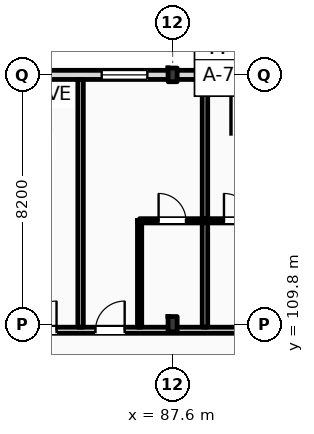
"""IFC4 building model, lengths in metres.
Left out: names, types, materials, properties, quantities, classifications, styles, units other than length and angle.
Written with IfcOpenShell. Run it as: python <this file> out.ifc"""

import sys

from ifc_helpers import new_model, si_unit, direction, frame, frame_2d, origin, origin_2d, place, context, subcontext, project, spatial, rectangle, i_section, extrude, element, fill, save


model = new_model("IFC4")
c1 = context("Model", 3, precision=1e-05, world=origin(), true_north=direction((0.0, 1.0)))
c2 = subcontext(c1, "Body", "Model", "MODEL_VIEW")
j1 = project(units=[si_unit("LENGTHUNIT", "METRE"), si_unit("PLANEANGLEUNIT", "RADIAN")], contexts=[c1])
p1 = place(None, origin())
s1 = spatial("IfcSite", under=j1, at=p1, CompositionType="ELEMENT")
p2 = place(p1, origin())
s2 = spatial("IfcBuilding", under=s1, at=p2, CompositionType="ELEMENT")
p3 = place(p2, frame((0.0, 0.0, 28.2)))
s3 = spatial("IfcBuildingStorey", under=s2, at=p3, CompositionType="ELEMENT", Elevation=28.2)
p4 = place(p3, frame((87.6, 109.8, 0.0), z_axis=(0.0, 0.0, 1.0), x_axis=(1.0, 0.0, 0.0)))
e1 = element("IfcColumn", 1, at=p4, inside=s3, PredefinedType="COLUMN", context=c2, shape_type="SweptSolid", body=[
    extrude(i_section(OverallWidth=0.3, OverallDepth=0.5, WebThickness=0.014, FlangeThickness=0.028, FilletRadius=0.027, at=origin_2d()), origin(), (0.0, 0.0, 1.0), 3.6),
])
p5 = place(p3, frame((87.6, 118.0, 0.0), z_axis=(0.0, 0.0, 1.0), x_axis=(1.0, 0.0, 0.0)))
e2 = element("IfcColumn", 2, at=p5, inside=s3, PredefinedType="COLUMN", context=c2, shape_type="SweptSolid", body=[
    extrude(i_section(OverallWidth=0.3, OverallDepth=0.45, WebThickness=0.014, FlangeThickness=0.026, FilletRadius=0.027, at=origin_2d()), origin(), (0.0, 0.0, 1.0), 3.6),
])
p6 = place(p3, frame((22.5, 118.0, 0.0), z_axis=(0.0, 0.0, 1.0), x_axis=(1.0, 0.0, 0.0)))
e3 = element("IfcWall", 3, at=p6, inside=s3, PredefinedType="STANDARD", context=c2, shape_type="SweptSolid", body=[
    extrude(rectangle(XDim=97.5, YDim=0.3, at=frame_2d((48.75, 0.0))), origin(), (0.0, 0.0, 1.0), 2.8),
])
p7 = place(p6, frame((0.91, 0.0, 0.9)))
e4 = element("IfcOpeningElement", 4, at=p7, cuts=e3, PredefinedType="OPENING", context=c2, shape_type="SweptSolid", body=[
    extrude(rectangle(XDim=0.9, YDim=1.72, at=frame_2d((0.45, 0.86))), frame((0.0, 0.16, 0.0), z_axis=(0.0, -1.0, 0.0), x_axis=(1.0, 0.0, 0.0)), (0.0, 0.0, 1.0), 0.32),
])
p8 = place(p6, frame((6.561, 0.0, 0.0)))
e5 = element("IfcOpeningElement", 5, at=p8, cuts=e3, PredefinedType="OPENING", context=c2, shape_type="SweptSolid", body=[
    extrude(rectangle(XDim=1.2, YDim=2.25, at=frame_2d((0.6, 1.125))), frame((0.0, 0.16, 0.0), z_axis=(0.0, -1.0, 0.0), x_axis=(1.0, 0.0, 0.0)), (0.0, 0.0, 1.0), 0.32),
])
p9 = place(p6, frame((11.477, 0.0, 0.9)))
e6 = element("IfcOpeningElement", 6, at=p9, cuts=e3, PredefinedType="OPENING", context=c2, shape_type="SweptSolid", body=[
    extrude(rectangle(XDim=1.1, YDim=1.5, at=frame_2d((0.55, 0.75))), frame((0.0, 0.16, 0.0), z_axis=(0.0, -1.0, 0.0), x_axis=(1.0, 0.0, 0.0)), (0.0, 0.0, 1.0), 0.32),
])
p10 = place(p6, frame((15.194, 0.0, 0.9)))
e7 = element("IfcOpeningElement", 7, at=p10, cuts=e3, PredefinedType="OPENING", context=c2, shape_type="SweptSolid", body=[
    extrude(rectangle(XDim=1.25, YDim=1.6, at=frame_2d((0.625, 0.8))), frame((0.0, 0.16, 0.0), z_axis=(0.0, -1.0, 0.0), x_axis=(1.0, 0.0, 0.0)), (0.0, 0.0, 1.0), 0.32),
])
p11 = place(p6, frame((19.509, 0.0, 0.9)))
e8 = element("IfcOpeningElement", 8, at=p11, cuts=e3, PredefinedType="OPENING", context=c2, shape_type="SweptSolid", body=[
    extrude(rectangle(XDim=1.4, YDim=1.7, at=frame_2d((0.7, 0.85))), frame((0.0, 0.16, 0.0), z_axis=(0.0, -1.0, 0.0), x_axis=(1.0, 0.0, 0.0)), (0.0, 0.0, 1.0), 0.32),
])
p12 = place(p6, frame((23.258, 0.0, 0.0)))
e9 = element("IfcOpeningElement", 9, at=p12, cuts=e3, PredefinedType="OPENING", context=c2, shape_type="SweptSolid", body=[
    extrude(rectangle(XDim=1.2, YDim=2.25, at=frame_2d((0.6, 1.125))), frame((0.0, 0.16, 0.0), z_axis=(0.0, -1.0, 0.0), x_axis=(1.0, 0.0, 0.0)), (0.0, 0.0, 1.0), 0.32),
])
p13 = place(p6, frame((28.115, 0.0, 0.9)))
e10 = element("IfcOpeningElement", 10, at=p13, cuts=e3, PredefinedType="OPENING", context=c2, shape_type="SweptSolid", body=[
    extrude(rectangle(XDim=1.75, YDim=1.72, at=frame_2d((0.875, 0.86))), frame((0.0, 0.16, 0.0), z_axis=(0.0, -1.0, 0.0), x_axis=(1.0, 0.0, 0.0)), (0.0, 0.0, 1.0), 0.32),
])
p14 = place(p6, frame((31.582, 0.0, 0.9)))
e11 = element("IfcOpeningElement", 11, at=p14, cuts=e3, PredefinedType="OPENING", context=c2, shape_type="SweptSolid", body=[
    extrude(rectangle(XDim=1.35, YDim=1.72, at=frame_2d((0.675, 0.86))), frame((0.0, 0.16, 0.0), z_axis=(0.0, -1.0, 0.0), x_axis=(1.0, 0.0, 0.0)), (0.0, 0.0, 1.0), 0.32),
])
p15 = place(p6, frame((37.379, 0.0, 0.0)))
e12 = element("IfcOpeningElement", 12, at=p15, cuts=e3, PredefinedType="OPENING", context=c2, shape_type="SweptSolid", body=[
    extrude(rectangle(XDim=1.2, YDim=2.25, at=frame_2d((0.6, 1.125))), frame((0.0, 0.16, 0.0), z_axis=(0.0, -1.0, 0.0), x_axis=(1.0, 0.0, 0.0)), (0.0, 0.0, 1.0), 0.32),
])
p16 = place(p6, frame((42.663, 0.0, 0.9)))
e13 = element("IfcOpeningElement", 13, at=p16, cuts=e3, PredefinedType="OPENING", context=c2, shape_type="SweptSolid", body=[
    extrude(rectangle(XDim=1.35, YDim=1.72, at=frame_2d((0.675, 0.86))), frame((0.0, 0.16, 0.0), z_axis=(0.0, -1.0, 0.0), x_axis=(1.0, 0.0, 0.0)), (0.0, 0.0, 1.0), 0.32),
])
p17 = place(p6, frame((45.119, 0.0, 0.9)))
e14 = element("IfcOpeningElement", 14, at=p17, cuts=e3, PredefinedType="OPENING", context=c2, shape_type="SweptSolid", body=[
    extrude(rectangle(XDim=2.871, YDim=1.72, at=frame_2d((1.436, 0.86))), frame((0.0, 0.16, 0.0), z_axis=(0.0, -1.0, 0.0), x_axis=(1.0, 0.0, 0.0)), (0.0, 0.0, 1.0), 0.32),
])
p18 = place(p6, frame((50.41, 0.0, 0.9)))
e15 = element("IfcOpeningElement", 15, at=p18, cuts=e3, PredefinedType="OPENING", context=c2, shape_type="SweptSolid", body=[
    extrude(rectangle(XDim=1.8, YDim=1.72, at=frame_2d((0.9, 0.86))), frame((0.0, 0.16, 0.0), z_axis=(0.0, -1.0, 0.0), x_axis=(1.0, 0.0, 0.0)), (0.0, 0.0, 1.0), 0.32),
])
p19 = place(p6, frame((54.375, 0.0, 0.0)))
e16 = element("IfcOpeningElement", 16, at=p19, cuts=e3, PredefinedType="OPENING", context=c2, shape_type="SweptSolid", body=[
    extrude(rectangle(XDim=1.2, YDim=2.25, at=frame_2d((0.6, 1.125))), frame((0.0, 0.16, 0.0), z_axis=(0.0, -1.0, 0.0), x_axis=(1.0, 0.0, 0.0)), (0.0, 0.0, 1.0), 0.32),
])
p20 = place(p6, frame((59.052, 0.0, 0.9)))
e17 = element("IfcOpeningElement", 17, at=p20, cuts=e3, PredefinedType="OPENING", context=c2, shape_type="SweptSolid", body=[
    extrude(rectangle(XDim=1.35, YDim=1.72, at=frame_2d((0.675, 0.86))), frame((0.0, 0.16, 0.0), z_axis=(0.0, -1.0, 0.0), x_axis=(1.0, 0.0, 0.0)), (0.0, 0.0, 1.0), 0.32),
])
p21 = place(p6, frame((62.768, 0.0, 0.9)))
e18 = element("IfcOpeningElement", 18, at=p21, cuts=e3, PredefinedType="OPENING", context=c2, shape_type="SweptSolid", body=[
    extrude(rectangle(XDim=1.5, YDim=1.72, at=frame_2d((0.75, 0.86))), frame((0.0, 0.16, 0.0), z_axis=(0.0, -1.0, 0.0), x_axis=(1.0, 0.0, 0.0)), (0.0, 0.0, 1.0), 0.32),
])
p22 = place(p6, frame((68.498, 0.0, 0.0)))
e19 = element("IfcOpeningElement", 19, at=p22, cuts=e3, PredefinedType="OPENING", context=c2, shape_type="SweptSolid", body=[
    extrude(rectangle(XDim=1.2, YDim=2.25, at=frame_2d((0.6, 1.125))), frame((0.0, 0.16, 0.0), z_axis=(0.0, -1.0, 0.0), x_axis=(1.0, 0.0, 0.0)), (0.0, 0.0, 1.0), 0.32),
])
p23 = place(p6, frame((71.265, 0.0, 0.9)))
e20 = element("IfcOpeningElement", 20, at=p23, cuts=e3, PredefinedType="OPENING", context=c2, shape_type="SweptSolid", body=[
    extrude(rectangle(XDim=0.9, YDim=1.72, at=frame_2d((0.45, 0.86))), frame((0.0, 0.16, 0.0), z_axis=(0.0, -1.0, 0.0), x_axis=(1.0, 0.0, 0.0)), (0.0, 0.0, 1.0), 0.32),
])
p24 = place(p6, frame((76.316, 0.0, 0.9)))
e21 = element("IfcOpeningElement", 21, at=p24, cuts=e3, PredefinedType="OPENING", context=c2, shape_type="SweptSolid", body=[
    extrude(rectangle(XDim=1.95, YDim=1.72, at=frame_2d((0.975, 0.86))), frame((0.0, 0.16, 0.0), z_axis=(0.0, -1.0, 0.0), x_axis=(1.0, 0.0, 0.0)), (0.0, 0.0, 1.0), 0.32),
])
p25 = place(p6, frame((81.632, 0.0, 0.9)))
e22 = element("IfcOpeningElement", 22, at=p25, cuts=e3, PredefinedType="OPENING", context=c2, shape_type="SweptSolid", body=[
    extrude(rectangle(XDim=1.35, YDim=1.72, at=frame_2d((0.675, 0.86))), frame((0.0, 0.16, 0.0), z_axis=(0.0, -1.0, 0.0), x_axis=(1.0, 0.0, 0.0)), (0.0, 0.0, 1.0), 0.32),
])
p26 = place(p6, frame((84.948, 0.0, 0.9)))
e23 = element("IfcOpeningElement", 23, at=p26, cuts=e3, PredefinedType="OPENING", context=c2, shape_type="SweptSolid", body=[
    extrude(rectangle(XDim=2.25, YDim=1.72, at=frame_2d((1.125, 0.86))), frame((0.0, 0.16, 0.0), z_axis=(0.0, -1.0, 0.0), x_axis=(1.0, 0.0, 0.0)), (0.0, 0.0, 1.0), 0.32),
])
p27 = place(p6, frame((90.063, 0.0, 0.9)))
e24 = element("IfcOpeningElement", 24, at=p27, cuts=e3, PredefinedType="OPENING", context=c2, shape_type="SweptSolid", body=[
    extrude(rectangle(XDim=1.8, YDim=1.72, at=frame_2d((0.9, 0.86))), frame((0.0, 0.16, 0.0), z_axis=(0.0, -1.0, 0.0), x_axis=(1.0, 0.0, 0.0)), (0.0, 0.0, 1.0), 0.32),
])
p28 = place(p6, frame((93.529, 0.0, 0.9)))
e25 = element("IfcOpeningElement", 25, at=p28, cuts=e3, PredefinedType="OPENING", context=c2, shape_type="SweptSolid", body=[
    extrude(rectangle(XDim=2.55, YDim=1.72, at=frame_2d((1.275, 0.86))), frame((0.0, 0.16, 0.0), z_axis=(0.0, -1.0, 0.0), x_axis=(1.0, 0.0, 0.0)), (0.0, 0.0, 1.0), 0.32),
])
p29 = place(p3, frame((10.65, 109.6, 0.0), z_axis=(0.0, 0.0, 1.0), x_axis=(1.0, 0.0, 0.0)))
e26 = element("IfcWall", 26, at=p29, inside=s3, PredefinedType="PARTITIONING", context=c2, shape_type="SweptSolid", body=[
    extrude(rectangle(XDim=109.21, YDim=0.2, at=frame_2d((54.605, 0.0))), origin(), (0.0, 0.0, 1.0), 2.8),
])
p30 = place(p29, frame((12.611, 0.0, 0.0)))
e27 = element("IfcOpeningElement", 27, at=p30, cuts=e26, PredefinedType="OPENING", context=c2, shape_type="SweptSolid", body=[
    extrude(rectangle(XDim=1.02, YDim=2.2, at=frame_2d((0.51, 1.1))), frame((0.0, 0.11, 0.0), z_axis=(0.0, -1.0, 0.0), x_axis=(1.0, 0.0, 0.0)), (0.0, 0.0, 1.0), 0.22),
])
p31 = place(p29, frame((19.451, 0.0, 0.0)))
e28 = element("IfcOpeningElement", 28, at=p31, cuts=e26, PredefinedType="OPENING", context=c2, shape_type="SweptSolid", body=[
    extrude(rectangle(XDim=1.02, YDim=2.2, at=frame_2d((0.51, 1.1))), frame((0.0, 0.11, 0.0), z_axis=(0.0, -1.0, 0.0), x_axis=(1.0, 0.0, 0.0)), (0.0, 0.0, 1.0), 0.22),
])
p32 = place(p29, frame((23.842, 0.0, 0.0)))
e29 = element("IfcOpeningElement", 29, at=p32, cuts=e26, PredefinedType="OPENING", context=c2, shape_type="SweptSolid", body=[
    extrude(rectangle(XDim=1.02, YDim=2.2, at=frame_2d((0.51, 1.1))), frame((0.0, 0.11, 0.0), z_axis=(0.0, -1.0, 0.0), x_axis=(1.0, 0.0, 0.0)), (0.0, 0.0, 1.0), 0.22),
])
p33 = place(p29, frame((26.084, 0.0, 0.0)))
e30 = element("IfcOpeningElement", 30, at=p33, cuts=e26, PredefinedType="OPENING", context=c2, shape_type="SweptSolid", body=[
    extrude(rectangle(XDim=1.02, YDim=2.2, at=frame_2d((0.51, 1.1))), frame((0.0, 0.11, 0.0), z_axis=(0.0, -1.0, 0.0), x_axis=(1.0, 0.0, 0.0)), (0.0, 0.0, 1.0), 0.22),
])
p34 = place(p29, frame((32.655, 0.0, 0.0)))
e31 = element("IfcOpeningElement", 31, at=p34, cuts=e26, PredefinedType="OPENING", context=c2, shape_type="SweptSolid", body=[
    extrude(rectangle(XDim=0.96, YDim=2.2, at=frame_2d((0.48, 1.1))), frame((0.0, 0.11, 0.0), z_axis=(0.0, -1.0, 0.0), x_axis=(1.0, 0.0, 0.0)), (0.0, 0.0, 1.0), 0.22),
])
p35 = place(p29, frame((34.895, 0.0, 0.0)))
e32 = element("IfcOpeningElement", 32, at=p35, cuts=e26, PredefinedType="OPENING", context=c2, shape_type="SweptSolid", body=[
    extrude(rectangle(XDim=0.96, YDim=2.2, at=frame_2d((0.48, 1.1))), frame((0.0, 0.11, 0.0), z_axis=(0.0, -1.0, 0.0), x_axis=(1.0, 0.0, 0.0)), (0.0, 0.0, 1.0), 0.22),
])
p36 = place(p29, frame((41.436, 0.0, 0.0)))
e33 = element("IfcOpeningElement", 33, at=p36, cuts=e26, PredefinedType="OPENING", context=c2, shape_type="SweptSolid", body=[
    extrude(rectangle(XDim=0.96, YDim=2.2, at=frame_2d((0.48, 1.1))), frame((0.0, 0.11, 0.0), z_axis=(0.0, -1.0, 0.0), x_axis=(1.0, 0.0, 0.0)), (0.0, 0.0, 1.0), 0.22),
])
p37 = place(p29, frame((43.427, 0.0, 0.0)))
e34 = element("IfcOpeningElement", 34, at=p37, cuts=e26, PredefinedType="OPENING", context=c2, shape_type="SweptSolid", body=[
    extrude(rectangle(XDim=0.96, YDim=2.2, at=frame_2d((0.48, 1.1))), frame((0.0, 0.11, 0.0), z_axis=(0.0, -1.0, 0.0), x_axis=(1.0, 0.0, 0.0)), (0.0, 0.0, 1.0), 0.22),
])
p38 = place(p29, frame((50.218, 0.0, 0.0)))
e35 = element("IfcOpeningElement", 35, at=p38, cuts=e26, PredefinedType="OPENING", context=c2, shape_type="SweptSolid", body=[
    extrude(rectangle(XDim=0.96, YDim=2.2, at=frame_2d((0.48, 1.1))), frame((0.0, 0.11, 0.0), z_axis=(0.0, -1.0, 0.0), x_axis=(1.0, 0.0, 0.0)), (0.0, 0.0, 1.0), 0.22),
])
p39 = place(p29, frame((54.859, 0.0, 0.0)))
e36 = element("IfcOpeningElement", 36, at=p39, cuts=e26, PredefinedType="OPENING", context=c2, shape_type="SweptSolid", body=[
    extrude(rectangle(XDim=0.96, YDim=2.2, at=frame_2d((0.48, 1.1))), frame((0.0, 0.11, 0.0), z_axis=(0.0, -1.0, 0.0), x_axis=(1.0, 0.0, 0.0)), (0.0, 0.0, 1.0), 0.22),
])
p40 = place(p29, frame((59.0, 0.0, 0.0)))
e37 = element("IfcOpeningElement", 37, at=p40, cuts=e26, PredefinedType="OPENING", context=c2, shape_type="SweptSolid", body=[
    extrude(rectangle(XDim=0.96, YDim=2.2, at=frame_2d((0.48, 1.1))), frame((0.0, 0.11, 0.0), z_axis=(0.0, -1.0, 0.0), x_axis=(1.0, 0.0, 0.0)), (0.0, 0.0, 1.0), 0.22),
])
p41 = place(p29, frame((63.39, 0.0, 0.0)))
e38 = element("IfcOpeningElement", 38, at=p41, cuts=e26, PredefinedType="OPENING", context=c2, shape_type="SweptSolid", body=[
    extrude(rectangle(XDim=0.96, YDim=2.2, at=frame_2d((0.48, 1.1))), frame((0.0, 0.11, 0.0), z_axis=(0.0, -1.0, 0.0), x_axis=(1.0, 0.0, 0.0)), (0.0, 0.0, 1.0), 0.22),
])
p42 = place(p29, frame((65.631, 0.0, 0.0)))
e39 = element("IfcOpeningElement", 39, at=p42, cuts=e26, PredefinedType="OPENING", context=c2, shape_type="SweptSolid", body=[
    extrude(rectangle(XDim=0.96, YDim=2.2, at=frame_2d((0.48, 1.1))), frame((0.0, 0.11, 0.0), z_axis=(0.0, -1.0, 0.0), x_axis=(1.0, 0.0, 0.0)), (0.0, 0.0, 1.0), 0.22),
])
p43 = place(p29, frame((72.172, 0.0, 0.0)))
e40 = element("IfcOpeningElement", 40, at=p43, cuts=e26, PredefinedType="OPENING", context=c2, shape_type="SweptSolid", body=[
    extrude(rectangle(XDim=0.96, YDim=2.2, at=frame_2d((0.48, 1.1))), frame((0.0, 0.11, 0.0), z_axis=(0.0, -1.0, 0.0), x_axis=(1.0, 0.0, 0.0)), (0.0, 0.0, 1.0), 0.22),
])
p44 = place(p29, frame((74.413, 0.0, 0.0)))
e41 = element("IfcOpeningElement", 41, at=p44, cuts=e26, PredefinedType="OPENING", context=c2, shape_type="SweptSolid", body=[
    extrude(rectangle(XDim=0.96, YDim=2.2, at=frame_2d((0.48, 1.1))), frame((0.0, 0.11, 0.0), z_axis=(0.0, -1.0, 0.0), x_axis=(1.0, 0.0, 0.0)), (0.0, 0.0, 1.0), 0.22),
])
p45 = place(p29, frame((80.954, 0.0, 0.0)))
e42 = element("IfcOpeningElement", 42, at=p45, cuts=e26, PredefinedType="OPENING", context=c2, shape_type="SweptSolid", body=[
    extrude(rectangle(XDim=0.96, YDim=2.2, at=frame_2d((0.48, 1.1))), frame((0.0, 0.11, 0.0), z_axis=(0.0, -1.0, 0.0), x_axis=(1.0, 0.0, 0.0)), (0.0, 0.0, 1.0), 0.22),
])
p46 = place(p29, frame((83.195, 0.0, 0.0)))
e43 = element("IfcOpeningElement", 43, at=p46, cuts=e26, PredefinedType="OPENING", context=c2, shape_type="SweptSolid", body=[
    extrude(rectangle(XDim=0.96, YDim=2.2, at=frame_2d((0.48, 1.1))), frame((0.0, 0.11, 0.0), z_axis=(0.0, -1.0, 0.0), x_axis=(1.0, 0.0, 0.0)), (0.0, 0.0, 1.0), 0.22),
])
p47 = place(p29, frame((89.735, 0.0, 0.0)))
e44 = element("IfcOpeningElement", 44, at=p47, cuts=e26, PredefinedType="OPENING", context=c2, shape_type="SweptSolid", body=[
    extrude(rectangle(XDim=0.96, YDim=2.2, at=frame_2d((0.48, 1.1))), frame((0.0, 0.11, 0.0), z_axis=(0.0, -1.0, 0.0), x_axis=(1.0, 0.0, 0.0)), (0.0, 0.0, 1.0), 0.22),
])
p48 = place(p29, frame((94.126, 0.0, 0.0)))
e45 = element("IfcOpeningElement", 45, at=p48, cuts=e26, PredefinedType="OPENING", context=c2, shape_type="SweptSolid", body=[
    extrude(rectangle(XDim=0.96, YDim=2.2, at=frame_2d((0.48, 1.1))), frame((0.0, 0.11, 0.0), z_axis=(0.0, -1.0, 0.0), x_axis=(1.0, 0.0, 0.0)), (0.0, 0.0, 1.0), 0.22),
])
p49 = place(p29, frame((98.517, 0.0, 0.0)))
e46 = element("IfcOpeningElement", 46, at=p49, cuts=e26, PredefinedType="OPENING", context=c2, shape_type="SweptSolid", body=[
    extrude(rectangle(XDim=0.96, YDim=2.2, at=frame_2d((0.48, 1.1))), frame((0.0, 0.11, 0.0), z_axis=(0.0, -1.0, 0.0), x_axis=(1.0, 0.0, 0.0)), (0.0, 0.0, 1.0), 0.22),
])
p50 = place(p29, frame((102.908, 0.0, 0.0)))
e47 = element("IfcOpeningElement", 47, at=p50, cuts=e26, PredefinedType="OPENING", context=c2, shape_type="SweptSolid", body=[
    extrude(rectangle(XDim=0.96, YDim=2.2, at=frame_2d((0.48, 1.1))), frame((0.0, 0.11, 0.0), z_axis=(0.0, -1.0, 0.0), x_axis=(1.0, 0.0, 0.0)), (0.0, 0.0, 1.0), 0.22),
])
p51 = place(p29, frame((105.099, 0.0, 0.0)))
e48 = element("IfcOpeningElement", 48, at=p51, cuts=e26, PredefinedType="OPENING", context=c2, shape_type="SweptSolid", body=[
    extrude(rectangle(XDim=0.96, YDim=2.2, at=frame_2d((0.48, 1.1))), frame((0.0, 0.11, 0.0), z_axis=(0.0, -1.0, 0.0), x_axis=(1.0, 0.0, 0.0)), (0.0, 0.0, 1.0), 0.22),
])
p52 = place(p29, frame((2.716, 0.0, 0.0)))
e49 = element("IfcOpeningElement", 49, at=p52, cuts=e26, PredefinedType="OPENING", context=c2, shape_type="SweptSolid", body=[
    extrude(rectangle(XDim=1.35, YDim=2.25, at=frame_2d((0.675, 1.125))), frame((0.0, 0.11, 0.0), z_axis=(0.0, -1.0, 0.0), x_axis=(1.0, 0.0, 0.0)), (0.0, 0.0, 1.0), 0.22),
])
p53 = place(p29, frame((6.65, 0.0, 0.0)))
e50 = element("IfcOpeningElement", 50, at=p53, cuts=e26, PredefinedType="OPENING", context=c2, shape_type="SweptSolid", body=[
    extrude(rectangle(XDim=1.35, YDim=2.25, at=frame_2d((0.675, 1.125))), frame((0.0, 0.11, 0.0), z_axis=(0.0, -1.0, 0.0), x_axis=(1.0, 0.0, 0.0)), (0.0, 0.0, 1.0), 0.22),
])
p54 = place(p29, frame((10.583, 0.0, 0.0)))
e51 = element("IfcOpeningElement", 51, at=p54, cuts=e26, PredefinedType="OPENING", context=c2, shape_type="SweptSolid", body=[
    extrude(rectangle(XDim=1.35, YDim=2.25, at=frame_2d((0.675, 1.125))), frame((0.0, 0.11, 0.0), z_axis=(0.0, -1.0, 0.0), x_axis=(1.0, 0.0, 0.0)), (0.0, 0.0, 1.0), 0.22),
])
for number, where, z_axis, x_axis in (
    (52, (84.573, 109.7, 0.0), (0.0, 0.0, 1.0), (0.0, 1.0, 0.0)),
    (53, (88.664, 109.7, 0.0), (0.0, 0.0, 1.0), (0.0, 1.0, 0.0)),
):
    element("IfcWall", number, at=place(p3, frame(where, z_axis=z_axis, x_axis=x_axis)), inside=s3, PredefinedType="PARTITIONING", context=c2, shape_type="SweptSolid", body=[
        extrude(rectangle(XDim=8.15, YDim=0.18, at=frame_2d((4.075, 0.0))), origin(), (0.0, 0.0, 1.0), 3.36),
    ])
p55 = place(p3, frame((86.514, 109.7, 0.0), z_axis=(0.0, 0.0, 1.0), x_axis=(0.0, 1.0, 0.0)))
e54 = element("IfcWall", 54, at=p55, inside=s3, PredefinedType="PARTITIONING", context=c2, shape_type="SweptSolid", body=[
    extrude(rectangle(XDim=3.5, YDim=0.14, at=frame_2d((1.75, 0.0))), origin(), (0.0, 0.0, 1.0), 3.36),
])
p56 = place(p3, frame((86.514, 113.2, 0.0), z_axis=(0.0, 0.0, 1.0), x_axis=(1.0, 0.0, 0.0)))
e55 = element("IfcWall", 55, at=p56, inside=s3, PredefinedType="PARTITIONING", context=c2, shape_type="SweptSolid", body=[
    extrude(rectangle(XDim=2.15, YDim=0.14, at=frame_2d((1.075, 0.0))), origin(), (0.0, 0.0, 1.0), 3.36),
])
p57 = place(p56, frame((0.625, 0.0, 0.0)))
e56 = element("IfcOpeningElement", 56, at=p57, cuts=e55, PredefinedType="OPENING", context=c2, shape_type="SweptSolid", body=[
    extrude(rectangle(XDim=0.9, YDim=2.1, at=frame_2d((0.45, 1.05))), frame((0.0, 0.08, 0.0), z_axis=(0.0, -1.0, 0.0), x_axis=(1.0, 0.0, 0.0)), (0.0, 0.0, 1.0), 0.16),
])
p58 = place(p3, frame((88.664, 113.2, 0.0), z_axis=(0.0, 0.0, 1.0), x_axis=(1.0, 0.0, 0.0)))
e57 = element("IfcWall", 57, at=p58, inside=s3, PredefinedType="PARTITIONING", context=c2, shape_type="SweptSolid", body=[
    extrude(rectangle(XDim=2.15, YDim=0.14, at=frame_2d((1.075, 0.0))), origin(), (0.0, 0.0, 1.0), 3.36),
])
p59 = place(p58, frame((0.625, 0.0, 0.0)))
e58 = element("IfcOpeningElement", 58, at=p59, cuts=e57, PredefinedType="OPENING", context=c2, shape_type="SweptSolid", body=[
    extrude(rectangle(XDim=0.9, YDim=2.1, at=frame_2d((0.45, 1.05))), frame((0.0, 0.08, 0.0), z_axis=(0.0, -1.0, 0.0), x_axis=(1.0, 0.0, 0.0)), (0.0, 0.0, 1.0), 0.16),
])
p60 = place(p21, origin())
e59 = element("IfcWindow", 59, at=p60, inside=s3, PartitioningType="DOUBLE_PANEL_VERTICAL", PredefinedType="WINDOW", context=c2, shape_type="SweptSolid", body=[
    extrude(rectangle(XDim=1.5, YDim=1.72, at=frame_2d((0.75, 0.86))), frame((0.0, 0.03, 0.0), z_axis=(0.0, -1.0, 0.0), x_axis=(1.0, 0.0, 0.0)), (0.0, 0.0, 1.0), 0.06),
])
fill(e18, e59)
p61 = place(p43, origin())
e60 = element("IfcDoor", 60, at=p61, inside=s3, OperationType="SINGLE_SWING_RIGHT", PredefinedType="DOOR", context=c2, shape_type="SweptSolid", body=[
    extrude(rectangle(XDim=0.96, YDim=2.2, at=frame_2d((0.48, 1.1))), frame((0.0, 0.025, 0.0), z_axis=(0.0, -1.0, 0.0), x_axis=(1.0, 0.0, 0.0)), (0.0, 0.0, 1.0), 0.05),
])
fill(e40, e60)
p62 = place(p44, origin())
e61 = element("IfcDoor", 61, at=p62, inside=s3, OperationType="SINGLE_SWING_RIGHT", PredefinedType="DOOR", context=c2, shape_type="SweptSolid", body=[
    extrude(rectangle(XDim=0.96, YDim=2.2, at=frame_2d((0.48, 1.1))), frame((0.0, 0.025, 0.0), z_axis=(0.0, -1.0, 0.0), x_axis=(1.0, 0.0, 0.0)), (0.0, 0.0, 1.0), 0.05),
])
fill(e41, e61)
p63 = place(p57, origin())
e62 = element("IfcDoor", 62, at=p63, inside=s3, OperationType="SINGLE_SWING_LEFT", PredefinedType="DOOR", context=c2, shape_type="SweptSolid", body=[
    extrude(rectangle(XDim=0.9, YDim=2.1, at=frame_2d((0.45, 1.05))), frame((0.0, 0.025, 0.0), z_axis=(0.0, -1.0, 0.0), x_axis=(1.0, 0.0, 0.0)), (0.0, 0.0, 1.0), 0.05),
])
fill(e56, e62)
p64 = place(p59, origin())
e63 = element("IfcDoor", 63, at=p64, inside=s3, OperationType="SINGLE_SWING_LEFT", PredefinedType="DOOR", context=c2, shape_type="SweptSolid", body=[
    extrude(rectangle(XDim=0.9, YDim=2.1, at=frame_2d((0.45, 1.05))), frame((0.0, 0.025, 0.0), z_axis=(0.0, -1.0, 0.0), x_axis=(1.0, 0.0, 0.0)), (0.0, 0.0, 1.0), 0.05),
])
fill(e58, e63)
save(model, sys.argv[1])
